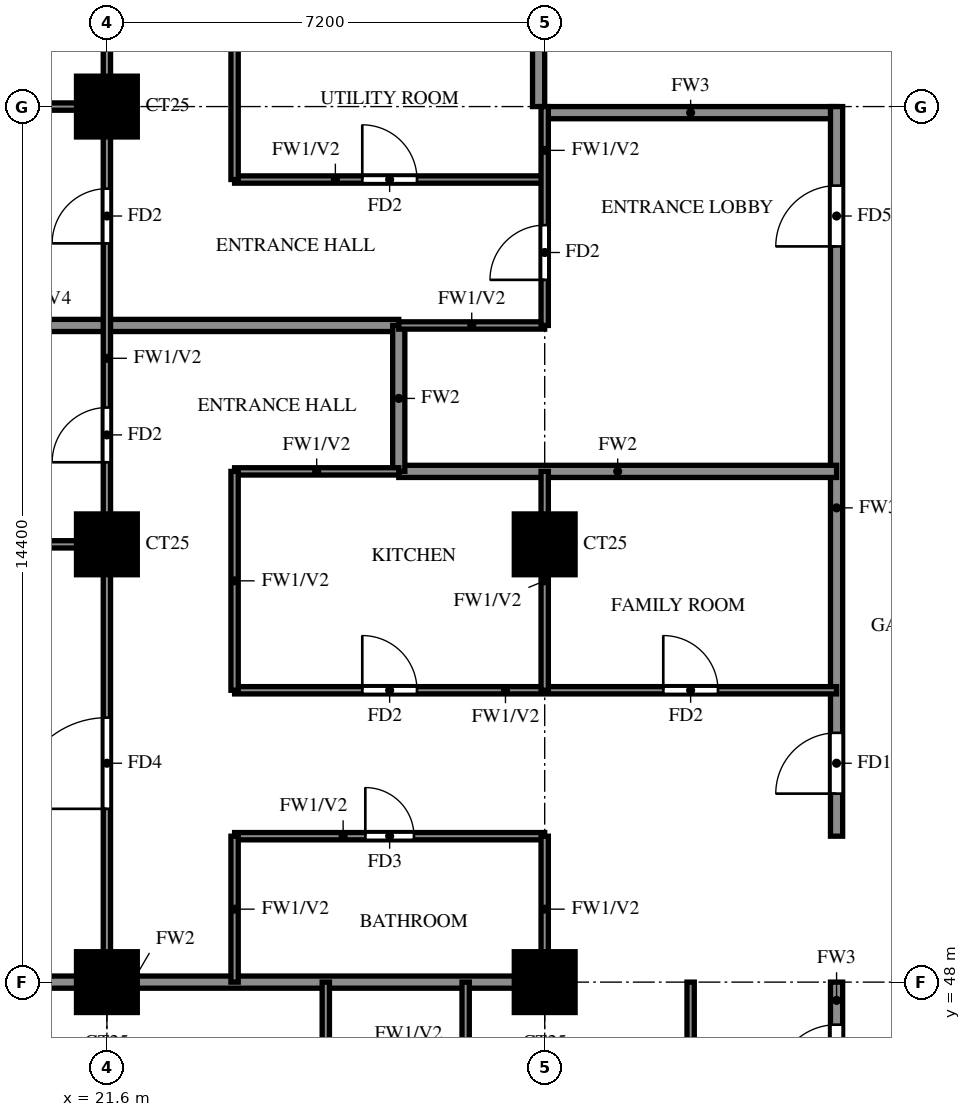
"""IFC4 building model, lengths in metres.
Left out: names, types, materials, properties, quantities, classifications, styles, units other than length and angle.
Written with IfcOpenShell. Run it as: python <this file> out.ifc"""

import sys

from ifc_helpers import new_model, si_unit, direction, frame, frame_2d, origin, origin_2d, place, context, subcontext, project, spatial, rectangle, extrude, source, transform, mapped, element, fill, save


model = new_model("IFC4")
c1 = context("Model", 3, precision=1e-05, world=origin(), true_north=direction((0.0, 1.0)))
c2 = subcontext(c1, "Body", "Model", "MODEL_VIEW")
j1 = project(units=[si_unit("LENGTHUNIT", "METRE"), si_unit("PLANEANGLEUNIT", "RADIAN")], contexts=[c1])
p1 = place(None, origin())
s1 = spatial("IfcSite", under=j1, at=p1, CompositionType="ELEMENT")
p2 = place(p1, origin())
s2 = spatial("IfcBuilding", under=s1, at=p2, CompositionType="ELEMENT")
p3 = place(p2, frame((0.0, 0.0, 160.5)))
s3 = spatial("IfcBuildingStorey", under=s2, at=p3, CompositionType="ELEMENT", Elevation=160.5)
m1 = source(origin(), c2, "Body", "SweptSolid", [
    extrude(rectangle(XDim=1.0, YDim=1.0, at=origin_2d()), origin(), (0.0, 0.0, 1.0), 3.2),
])
for number, where, z_axis, x_axis in (
    (1, (21.6, 48.0, 0.0), (0.0, 0.0, 1.0), (1.0, 0.0, 0.0)),
    (2, (28.8, 48.0, 0.0), (0.0, 0.0, 1.0), (1.0, 0.0, 0.0)),
    (3, (21.6, 55.2, 0.0), (0.0, 0.0, 1.0), (1.0, 0.0, 0.0)),
    (4, (28.8, 55.2, 0.0), (0.0, 0.0, 1.0), (1.0, 0.0, 0.0)),
    (5, (21.6, 62.4, 0.0), (0.0, 0.0, 1.0), (1.0, 0.0, 0.0)),
):
    element("IfcColumn", number, at=place(p3, frame(where, z_axis=z_axis, x_axis=x_axis)), inside=s3, PredefinedType="COLUMN", context=c2, shape_type="MappedRepresentation", body=[
        mapped(m1, transform((0.0, 0.0, 0.0))),
    ])
p4 = place(p3, frame((28.8, 62.3, 0.0), z_axis=(0.0, 0.0, 1.0), x_axis=(1.0, 0.0, 0.0)))
e6 = element("IfcWall", 6, at=p4, inside=s3, PredefinedType="SOLIDWALL", context=c2, shape_type="SweptSolid", body=[
    extrude(rectangle(XDim=4.8, YDim=0.2, at=frame_2d((2.4, 0.0))), origin(), (0.0, 0.0, 1.0), 3.2),
])
p5 = place(p3, frame((28.7, 62.4, 0.0), z_axis=(0.0, 0.0, 1.0), x_axis=(0.0, 1.0, 0.0)))
e7 = element("IfcWall", 7, at=p5, inside=s3, PredefinedType="SOLIDWALL", context=c2, shape_type="SweptSolid", body=[
    extrude(rectangle(XDim=15.6, YDim=0.2, at=frame_2d((7.8, 0.0))), origin(), (0.0, 0.0, 1.0), 3.2),
])
p6 = place(p3, frame((33.6, 45.6, 0.0), z_axis=(0.0, 0.0, 1.0), x_axis=(0.0, 1.0, 0.0)))
e8 = element("IfcWall", 8, at=p6, inside=s3, PredefinedType="SOLIDWALL", context=c2, shape_type="SweptSolid", body=[
    extrude(rectangle(XDim=2.4, YDim=0.2, at=frame_2d((1.2, 0.0))), origin(), (0.0, 0.0, 1.0), 3.2),
])
p7 = place(p6, frame((0.7, 0.0, 0.0)))
e9 = element("IfcOpeningElement", 9, at=p7, cuts=e8, PredefinedType="OPENING", context=c2, shape_type="SweptSolid", body=[
    extrude(rectangle(XDim=1.0, YDim=2.1, at=frame_2d((0.5, 1.05))), frame((0.0, 0.11, 0.0), z_axis=(0.0, -1.0, 0.0), x_axis=(1.0, 0.0, 0.0)), (0.0, 0.0, 1.0), 0.22),
])
p8 = place(p3, frame((33.6, 50.4, 0.0), z_axis=(0.0, 0.0, 1.0), x_axis=(0.0, 1.0, 0.0)))
e10 = element("IfcWall", 10, at=p8, inside=s3, PredefinedType="SOLIDWALL", context=c2, shape_type="SweptSolid", body=[
    extrude(rectangle(XDim=12.0, YDim=0.2, at=frame_2d((6.0, 0.0))), origin(), (0.0, 0.0, 1.0), 3.2),
])
p9 = place(p8, frame((0.7, 0.0, 0.0)))
e11 = element("IfcOpeningElement", 11, at=p9, cuts=e10, PredefinedType="OPENING", context=c2, shape_type="SweptSolid", body=[
    extrude(rectangle(XDim=1.0, YDim=2.1, at=frame_2d((0.5, 1.05))), frame((0.0, 0.11, 0.0), z_axis=(0.0, -1.0, 0.0), x_axis=(1.0, 0.0, 0.0)), (0.0, 0.0, 1.0), 0.22),
])
p10 = place(p8, frame((9.7, 0.0, 0.0)))
e12 = element("IfcOpeningElement", 12, at=p10, cuts=e10, PredefinedType="OPENING", context=c2, shape_type="SweptSolid", body=[
    extrude(rectangle(XDim=1.0, YDim=2.1, at=frame_2d((0.5, 1.05))), frame((0.0, 0.11, 0.0), z_axis=(0.0, -1.0, 0.0), x_axis=(1.0, 0.0, 0.0)), (0.0, 0.0, 1.0), 0.22),
])
p11 = place(p3, frame((14.525, 48.0, 0.0), z_axis=(0.0, 0.0, 1.0), x_axis=(1.0, 0.0, 0.0)))
e13 = element("IfcWall", 13, at=p11, inside=s3, PredefinedType="SOLIDWALL", context=c2, shape_type="SweptSolid", body=[
    extrude(rectangle(XDim=14.275, YDim=0.2, at=frame_2d((7.138, 0.0))), origin(), (0.0, 0.0, 1.0), 3.2),
])
p12 = place(p3, frame((26.4, 56.4, 0.0), z_axis=(0.0, 0.0, 1.0), x_axis=(1.0, 0.0, 0.0)))
e14 = element("IfcWall", 14, at=p12, inside=s3, PredefinedType="SOLIDWALL", context=c2, shape_type="SweptSolid", body=[
    extrude(rectangle(XDim=7.2, YDim=0.2, at=frame_2d((3.6, 0.0))), origin(), (0.0, 0.0, 1.0), 3.2),
])
p13 = place(p3, frame((14.525, 58.8, 0.0), z_axis=(0.0, 0.0, 1.0), x_axis=(1.0, 0.0, 0.0)))
e15 = element("IfcWall", 15, at=p13, inside=s3, PredefinedType="SOLIDWALL", context=c2, shape_type="SweptSolid", body=[
    extrude(rectangle(XDim=11.875, YDim=0.2, at=frame_2d((5.938, 0.0))), origin(), (0.0, 0.0, 1.0), 2.3),
])
p14 = place(p3, frame((26.4, 56.4, 0.0), z_axis=(0.0, 0.0, 1.0), x_axis=(0.0, 1.0, 0.0)))
e16 = element("IfcWall", 16, at=p14, inside=s3, PredefinedType="SOLIDWALL", context=c2, shape_type="SweptSolid", body=[
    extrude(rectangle(XDim=2.4, YDim=0.2, at=frame_2d((1.2, 0.0))), origin(), (0.0, 0.0, 1.0), 3.2),
])
p15 = place(p3, frame((23.7, 50.4, 0.0), z_axis=(0.0, 0.0, 1.0), x_axis=(1.0, 0.0, 0.0)))
e17 = element("IfcWall", 17, at=p15, inside=s3, PredefinedType="PARTITIONING", context=c2, shape_type="SweptSolid", body=[
    extrude(rectangle(XDim=5.1, YDim=0.12, at=frame_2d((2.55, 0.0))), origin(), (0.0, 0.0, 1.0), 3.2),
])
p16 = place(p15, frame((2.15, 0.0, 0.0)))
e18 = element("IfcOpeningElement", 18, at=p16, cuts=e17, PredefinedType="OPENING", context=c2, shape_type="SweptSolid", body=[
    extrude(rectangle(XDim=0.8, YDim=2.1, at=frame_2d((0.4, 1.05))), frame((0.0, 0.07, 0.0), z_axis=(0.0, -1.0, 0.0), x_axis=(1.0, 0.0, 0.0)), (0.0, 0.0, 1.0), 0.14),
])
p17 = place(p3, frame((23.7, 52.8, 0.0), z_axis=(0.0, 0.0, 1.0), x_axis=(1.0, 0.0, 0.0)))
e19 = element("IfcWall", 19, at=p17, inside=s3, PredefinedType="PARTITIONING", context=c2, shape_type="SweptSolid", body=[
    extrude(rectangle(XDim=9.9, YDim=0.12, at=frame_2d((4.95, 0.0))), origin(), (0.0, 0.0, 1.0), 3.2),
])
p18 = place(p17, frame((2.1, 0.0, 0.0)))
e20 = element("IfcOpeningElement", 20, at=p18, cuts=e19, PredefinedType="OPENING", context=c2, shape_type="SweptSolid", body=[
    extrude(rectangle(XDim=0.9, YDim=2.1, at=frame_2d((0.45, 1.05))), frame((0.0, 0.07, 0.0), z_axis=(0.0, -1.0, 0.0), x_axis=(1.0, 0.0, 0.0)), (0.0, 0.0, 1.0), 0.14),
])
p19 = place(p17, frame((7.05, 0.0, 0.0)))
e21 = element("IfcOpeningElement", 21, at=p19, cuts=e19, PredefinedType="OPENING", context=c2, shape_type="SweptSolid", body=[
    extrude(rectangle(XDim=0.9, YDim=2.1, at=frame_2d((0.45, 1.05))), frame((0.0, 0.07, 0.0), z_axis=(0.0, -1.0, 0.0), x_axis=(1.0, 0.0, 0.0)), (0.0, 0.0, 1.0), 0.14),
])
p20 = place(p3, frame((14.525, 55.2, 0.0), z_axis=(0.0, 0.0, 1.0), x_axis=(1.0, 0.0, 0.0)))
e22 = element("IfcWall", 22, at=p20, inside=s3, PredefinedType="PARTITIONING", context=c2, shape_type="SweptSolid", body=[
    extrude(rectangle(XDim=7.075, YDim=0.12, at=frame_2d((3.538, 0.0))), origin(), (0.0, 0.0, 1.0), 3.2),
])
p21 = place(p3, frame((23.7, 56.4, 0.0), z_axis=(0.0, 0.0, 1.0), x_axis=(1.0, 0.0, 0.0)))
e23 = element("IfcWall", 23, at=p21, inside=s3, PredefinedType="PARTITIONING", context=c2, shape_type="SweptSolid", body=[
    extrude(rectangle(XDim=2.7, YDim=0.12, at=frame_2d((1.35, 0.0))), origin(), (0.0, 0.0, 1.0), 3.2),
])
p22 = place(p3, frame((26.4, 58.8, 0.0), z_axis=(0.0, 0.0, 1.0), x_axis=(1.0, 0.0, 0.0)))
e24 = element("IfcWall", 24, at=p22, inside=s3, PredefinedType="PARTITIONING", context=c2, shape_type="SweptSolid", body=[
    extrude(rectangle(XDim=2.4, YDim=0.12, at=frame_2d((1.2, 0.0))), origin(), (0.0, 0.0, 1.0), 3.2),
])
p23 = place(p3, frame((23.7, 61.2, 0.0), z_axis=(0.0, 0.0, 1.0), x_axis=(1.0, 0.0, 0.0)))
e25 = element("IfcWall", 25, at=p23, inside=s3, PredefinedType="PARTITIONING", context=c2, shape_type="SweptSolid", body=[
    extrude(rectangle(XDim=5.1, YDim=0.12, at=frame_2d((2.55, 0.0))), origin(), (0.0, 0.0, 1.0), 3.2),
])
p24 = place(p23, frame((2.1, 0.0, 0.0)))
e26 = element("IfcOpeningElement", 26, at=p24, cuts=e25, PredefinedType="OPENING", context=c2, shape_type="SweptSolid", body=[
    extrude(rectangle(XDim=0.9, YDim=2.1, at=frame_2d((0.45, 1.05))), frame((0.0, 0.07, 0.0), z_axis=(0.0, -1.0, 0.0), x_axis=(1.0, 0.0, 0.0)), (0.0, 0.0, 1.0), 0.14),
])
p25 = place(p3, frame((14.525, 62.4, 0.0), z_axis=(0.0, 0.0, 1.0), x_axis=(1.0, 0.0, 0.0)))
e27 = element("IfcWall", 27, at=p25, inside=s3, PredefinedType="PARTITIONING", context=c2, shape_type="SweptSolid", body=[
    extrude(rectangle(XDim=7.075, YDim=0.12, at=frame_2d((3.538, 0.0))), origin(), (0.0, 0.0, 1.0), 3.2),
])
p26 = place(p3, frame((21.6, 48.0, 0.0), z_axis=(0.0, 0.0, 1.0), x_axis=(0.0, 1.0, 0.0)))
e28 = element("IfcWall", 28, at=p26, inside=s3, PredefinedType="PARTITIONING", context=c2, shape_type="SweptSolid", body=[
    extrude(rectangle(XDim=21.6, YDim=0.12, at=frame_2d((10.8, 0.0))), origin(), (0.0, 0.0, 1.0), 3.2),
])
p27 = place(p26, frame((2.85, 0.0, 0.0)))
e29 = element("IfcOpeningElement", 29, at=p27, cuts=e28, PredefinedType="OPENING", context=c2, shape_type="SweptSolid", body=[
    extrude(rectangle(XDim=1.5, YDim=2.1, at=frame_2d((0.75, 1.05))), frame((0.0, 0.07, 0.0), z_axis=(0.0, -1.0, 0.0), x_axis=(1.0, 0.0, 0.0)), (0.0, 0.0, 1.0), 0.14),
])
p28 = place(p26, frame((8.55, 0.0, 0.0)))
e30 = element("IfcOpeningElement", 30, at=p28, cuts=e28, PredefinedType="OPENING", context=c2, shape_type="SweptSolid", body=[
    extrude(rectangle(XDim=0.9, YDim=2.1, at=frame_2d((0.45, 1.05))), frame((0.0, 0.07, 0.0), z_axis=(0.0, -1.0, 0.0), x_axis=(1.0, 0.0, 0.0)), (0.0, 0.0, 1.0), 0.14),
])
p29 = place(p26, frame((12.15, 0.0, 0.0)))
e31 = element("IfcOpeningElement", 31, at=p29, cuts=e28, PredefinedType="OPENING", context=c2, shape_type="SweptSolid", body=[
    extrude(rectangle(XDim=0.9, YDim=2.1, at=frame_2d((0.45, 1.05))), frame((0.0, 0.07, 0.0), z_axis=(0.0, -1.0, 0.0), x_axis=(1.0, 0.0, 0.0)), (0.0, 0.0, 1.0), 0.14),
])
p30 = place(p26, frame((17.55, 0.0, 0.0)))
e32 = element("IfcOpeningElement", 32, at=p30, cuts=e28, PredefinedType="OPENING", context=c2, shape_type="SweptSolid", body=[
    extrude(rectangle(XDim=0.9, YDim=2.1, at=frame_2d((0.45, 1.05))), frame((0.0, 0.07, 0.0), z_axis=(0.0, -1.0, 0.0), x_axis=(1.0, 0.0, 0.0)), (0.0, 0.0, 1.0), 0.14),
])
p31 = place(p3, frame((23.7, 48.0, 0.0), z_axis=(0.0, 0.0, 1.0), x_axis=(0.0, 1.0, 0.0)))
e33 = element("IfcWall", 33, at=p31, inside=s3, PredefinedType="PARTITIONING", context=c2, shape_type="SweptSolid", body=[
    extrude(rectangle(XDim=2.4, YDim=0.12, at=frame_2d((1.2, 0.0))), origin(), (0.0, 0.0, 1.0), 3.2),
])
p32 = place(p3, frame((23.7, 52.8, 0.0), z_axis=(0.0, 0.0, 1.0), x_axis=(0.0, 1.0, 0.0)))
e34 = element("IfcWall", 34, at=p32, inside=s3, PredefinedType="PARTITIONING", context=c2, shape_type="SweptSolid", body=[
    extrude(rectangle(XDim=3.6, YDim=0.12, at=frame_2d((1.8, 0.0))), origin(), (0.0, 0.0, 1.0), 3.2),
])
p33 = place(p3, frame((23.7, 61.2, 0.0), z_axis=(0.0, 0.0, 1.0), x_axis=(0.0, 1.0, 0.0)))
e35 = element("IfcWall", 35, at=p33, inside=s3, PredefinedType="PARTITIONING", context=c2, shape_type="SweptSolid", body=[
    extrude(rectangle(XDim=12.0, YDim=0.12, at=frame_2d((6.0, 0.0))), origin(), (0.0, 0.0, 1.0), 3.2),
])
p34 = place(p33, frame((4.2, 0.0, 0.0)))
e36 = element("IfcOpeningElement", 36, at=p34, cuts=e35, PredefinedType="OPENING", context=c2, shape_type="SweptSolid", body=[
    extrude(rectangle(XDim=0.9, YDim=2.1, at=frame_2d((0.45, 1.05))), frame((0.0, 0.07, 0.0), z_axis=(0.0, -1.0, 0.0), x_axis=(1.0, 0.0, 0.0)), (0.0, 0.0, 1.0), 0.14),
])
p35 = place(p33, frame((7.975, 0.0, 0.0)))
e37 = element("IfcOpeningElement", 37, at=p35, cuts=e35, PredefinedType="OPENING", context=c2, shape_type="SweptSolid", body=[
    extrude(rectangle(XDim=0.8, YDim=2.1, at=frame_2d((0.4, 1.05))), frame((0.0, 0.07, 0.0), z_axis=(0.0, -1.0, 0.0), x_axis=(1.0, 0.0, 0.0)), (0.0, 0.0, 1.0), 0.14),
])
p36 = place(p33, frame((10.45, 0.0, 0.0)))
e38 = element("IfcOpeningElement", 38, at=p36, cuts=e35, PredefinedType="OPENING", context=c2, shape_type="SweptSolid", body=[
    extrude(rectangle(XDim=0.8, YDim=2.1, at=frame_2d((0.4, 1.05))), frame((0.0, 0.07, 0.0), z_axis=(0.0, -1.0, 0.0), x_axis=(1.0, 0.0, 0.0)), (0.0, 0.0, 1.0), 0.14),
])
p37 = place(p3, frame((25.2, 39.725, 0.0), z_axis=(0.0, 0.0, 1.0), x_axis=(0.0, 1.0, 0.0)))
e39 = element("IfcWall", 39, at=p37, inside=s3, PredefinedType="PARTITIONING", context=c2, shape_type="SweptSolid", body=[
    extrude(rectangle(XDim=8.275, YDim=0.12, at=frame_2d((4.137, 0.0))), origin(), (0.0, 0.0, 1.0), 3.2),
])
p38 = place(p37, frame((4.525, 0.0, 0.0)))
e40 = element("IfcOpeningElement", 40, at=p38, cuts=e39, PredefinedType="OPENING", context=c2, shape_type="SweptSolid", body=[
    extrude(rectangle(XDim=0.9, YDim=2.1, at=frame_2d((0.45, 1.05))), frame((0.0, 0.07, 0.0), z_axis=(0.0, -1.0, 0.0), x_axis=(1.0, 0.0, 0.0)), (0.0, 0.0, 1.0), 0.14),
])
for number, where, z_axis, x_axis in (
    (41, (27.5, 45.6, 0.0), (0.0, 0.0, 1.0), (0.0, 1.0, 0.0)),
    (42, (28.8, 48.0, 0.0), (0.0, 0.0, 1.0), (0.0, 1.0, 0.0)),
):
    element("IfcWall", number, at=place(p3, frame(where, z_axis=z_axis, x_axis=x_axis)), inside=s3, PredefinedType="PARTITIONING", context=c2, shape_type="SweptSolid", body=[
        extrude(rectangle(XDim=2.4, YDim=0.12, at=frame_2d((1.2, 0.0))), origin(), (0.0, 0.0, 1.0), 3.2),
    ])
p39 = place(p3, frame((28.8, 52.8, 0.0), z_axis=(0.0, 0.0, 1.0), x_axis=(0.0, 1.0, 0.0)))
e43 = element("IfcWall", 43, at=p39, inside=s3, PredefinedType="PARTITIONING", context=c2, shape_type="SweptSolid", body=[
    extrude(rectangle(XDim=3.6, YDim=0.12, at=frame_2d((1.8, 0.0))), origin(), (0.0, 0.0, 1.0), 3.2),
])
p40 = place(p3, frame((28.8, 58.8, 0.0), z_axis=(0.0, 0.0, 1.0), x_axis=(0.0, 1.0, 0.0)))
e44 = element("IfcWall", 44, at=p40, inside=s3, PredefinedType="PARTITIONING", context=c2, shape_type="SweptSolid", body=[
    extrude(rectangle(XDim=3.6, YDim=0.12, at=frame_2d((1.8, 0.0))), origin(), (0.0, 0.0, 1.0), 3.2),
])
p41 = place(p40, frame((0.75, 0.0, 0.0)))
e45 = element("IfcOpeningElement", 45, at=p41, cuts=e44, PredefinedType="OPENING", context=c2, shape_type="SweptSolid", body=[
    extrude(rectangle(XDim=0.9, YDim=2.1, at=frame_2d((0.45, 1.05))), frame((0.0, 0.07, 0.0), z_axis=(0.0, -1.0, 0.0), x_axis=(1.0, 0.0, 0.0)), (0.0, 0.0, 1.0), 0.14),
])
p42 = place(p3, frame((31.2, 45.6, 0.0), z_axis=(0.0, 0.0, 1.0), x_axis=(0.0, 1.0, 0.0)))
e46 = element("IfcWall", 46, at=p42, inside=s3, PredefinedType="PARTITIONING", context=c2, shape_type="SweptSolid", body=[
    extrude(rectangle(XDim=2.4, YDim=0.12, at=frame_2d((1.2, 0.0))), origin(), (0.0, 0.0, 1.0), 3.2),
])
p43 = place(p7, origin())
e47 = element("IfcDoor", 47, at=p43, inside=s3, OperationType="SINGLE_SWING_RIGHT", PredefinedType="DOOR", context=c2, shape_type="SweptSolid", body=[
    extrude(rectangle(XDim=1.0, YDim=2.1, at=frame_2d((0.5, 1.05))), frame((0.0, 0.025, 0.0), z_axis=(0.0, -1.0, 0.0), x_axis=(1.0, 0.0, 0.0)), (0.0, 0.0, 1.0), 0.05),
])
fill(e9, e47)
p44 = place(p9, origin())
e48 = element("IfcDoor", 48, at=p44, inside=s3, OperationType="SINGLE_SWING_LEFT", PredefinedType="DOOR", context=c2, shape_type="SweptSolid", body=[
    extrude(rectangle(XDim=1.0, YDim=2.1, at=frame_2d((0.5, 1.05))), frame((0.0, 0.025, 0.0), z_axis=(0.0, -1.0, 0.0), x_axis=(1.0, 0.0, 0.0)), (0.0, 0.0, 1.0), 0.05),
])
fill(e11, e48)
p45 = place(p27, origin())
e49 = element("IfcDoor", 49, at=p45, inside=s3, OperationType="SINGLE_SWING_LEFT", PredefinedType="DOOR", context=c2, shape_type="SweptSolid", body=[
    extrude(rectangle(XDim=1.5, YDim=2.1, at=frame_2d((0.75, 1.05))), frame((0.0, 0.025, 0.0), z_axis=(0.0, -1.0, 0.0), x_axis=(1.0, 0.0, 0.0)), (0.0, 0.0, 1.0), 0.05),
])
fill(e29, e49)
p46 = place(p28, origin())
e50 = element("IfcDoor", 50, at=p46, inside=s3, OperationType="SINGLE_SWING_RIGHT", PredefinedType="DOOR", context=c2, shape_type="SweptSolid", body=[
    extrude(rectangle(XDim=0.9, YDim=2.1, at=frame_2d((0.45, 1.05))), frame((0.0, 0.025, 0.0), z_axis=(0.0, -1.0, 0.0), x_axis=(1.0, 0.0, 0.0)), (0.0, 0.0, 1.0), 0.05),
])
fill(e30, e50)
p47 = place(p16, origin())
e51 = element("IfcDoor", 51, at=p47, inside=s3, OperationType="SINGLE_SWING_LEFT", PredefinedType="DOOR", context=c2, shape_type="SweptSolid", body=[
    extrude(rectangle(XDim=0.8, YDim=2.1, at=frame_2d((0.4, 1.05))), frame((0.0, 0.025, 0.0), z_axis=(0.0, -1.0, 0.0), x_axis=(1.0, 0.0, 0.0)), (0.0, 0.0, 1.0), 0.05),
])
fill(e18, e51)
p48 = place(p18, origin())
e52 = element("IfcDoor", 52, at=p48, inside=s3, OperationType="SINGLE_SWING_LEFT", PredefinedType="DOOR", context=c2, shape_type="SweptSolid", body=[
    extrude(rectangle(XDim=0.9, YDim=2.1, at=frame_2d((0.45, 1.05))), frame((0.0, 0.025, 0.0), z_axis=(0.0, -1.0, 0.0), x_axis=(1.0, 0.0, 0.0)), (0.0, 0.0, 1.0), 0.05),
])
fill(e20, e52)
p49 = place(p19, origin())
e53 = element("IfcDoor", 53, at=p49, inside=s3, OperationType="SINGLE_SWING_RIGHT", PredefinedType="DOOR", context=c2, shape_type="SweptSolid", body=[
    extrude(rectangle(XDim=0.9, YDim=2.1, at=frame_2d((0.45, 1.05))), frame((0.0, 0.025, 0.0), z_axis=(0.0, -1.0, 0.0), x_axis=(1.0, 0.0, 0.0)), (0.0, 0.0, 1.0), 0.05),
])
fill(e21, e53)
p50 = place(p41, origin())
e54 = element("IfcDoor", 54, at=p50, inside=s3, OperationType="SINGLE_SWING_LEFT", PredefinedType="DOOR", context=c2, shape_type="SweptSolid", body=[
    extrude(rectangle(XDim=0.9, YDim=2.1, at=frame_2d((0.45, 1.05))), frame((0.0, 0.025, 0.0), z_axis=(0.0, -1.0, 0.0), x_axis=(1.0, 0.0, 0.0)), (0.0, 0.0, 1.0), 0.05),
])
fill(e45, e54)
p51 = place(p10, origin())
e55 = element("IfcDoor", 55, at=p51, inside=s3, OperationType="SINGLE_SWING_RIGHT", PredefinedType="DOOR", context=c2, shape_type="SweptSolid", body=[
    extrude(rectangle(XDim=1.0, YDim=2.1, at=frame_2d((0.5, 1.05))), frame((0.0, 0.025, 0.0), z_axis=(0.0, -1.0, 0.0), x_axis=(1.0, 0.0, 0.0)), (0.0, 0.0, 1.0), 0.05),
])
fill(e12, e55)
p52 = place(p29, origin())
e56 = element("IfcDoor", 56, at=p52, inside=s3, OperationType="SINGLE_SWING_LEFT", PredefinedType="DOOR", context=c2, shape_type="SweptSolid", body=[
    extrude(rectangle(XDim=0.9, YDim=2.1, at=frame_2d((0.45, 1.05))), frame((0.0, 0.025, 0.0), z_axis=(0.0, -1.0, 0.0), x_axis=(1.0, 0.0, 0.0)), (0.0, 0.0, 1.0), 0.05),
])
fill(e31, e56)
p53 = place(p24, origin())
e57 = element("IfcDoor", 57, at=p53, inside=s3, OperationType="SINGLE_SWING_LEFT", PredefinedType="DOOR", context=c2, shape_type="SweptSolid", body=[
    extrude(rectangle(XDim=0.9, YDim=2.1, at=frame_2d((0.45, 1.05))), frame((0.0, 0.025, 0.0), z_axis=(0.0, -1.0, 0.0), x_axis=(1.0, 0.0, 0.0)), (0.0, 0.0, 1.0), 0.05),
])
fill(e26, e57)
save(model, sys.argv[1])
